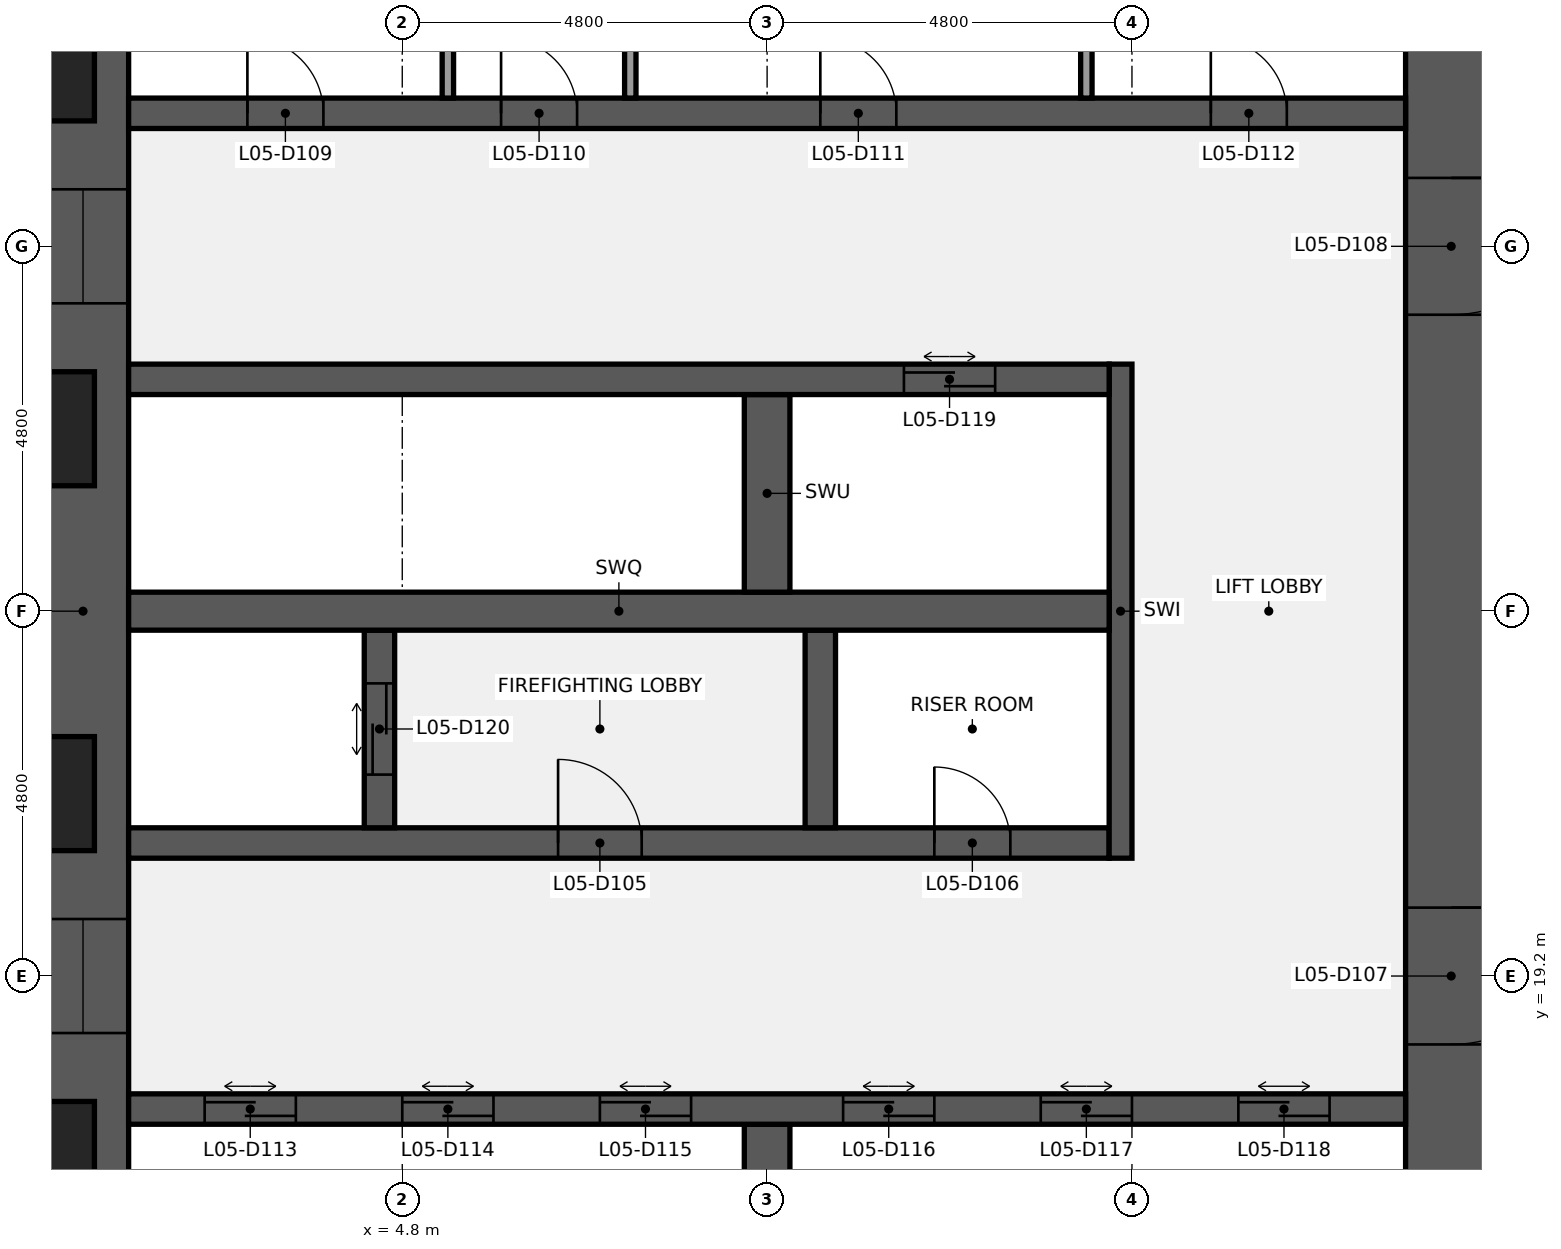
"""IFC4 building model, lengths in metres.
Left out: names, types, materials, properties, quantities, classifications, styles, units other than length and angle.
Written with IfcOpenShell. Run it as: python <this file> out.ifc"""

import sys

from ifc_helpers import new_model, si_unit, direction, frame, frame_2d, origin, place, context, subcontext, project, spatial, rectangle, extrude, element, fill, save


model = new_model("IFC4")
c1 = context("Model", 3, precision=1e-05, world=origin(), true_north=direction((0.0, 1.0)))
c2 = subcontext(c1, "Body", "Model", "MODEL_VIEW")
j1 = project(units=[si_unit("LENGTHUNIT", "METRE"), si_unit("PLANEANGLEUNIT", "RADIAN")], contexts=[c1])
p1 = place(None, origin())
s1 = spatial("IfcSite", under=j1, at=p1, CompositionType="ELEMENT")
p2 = place(p1, origin())
s2 = spatial("IfcBuilding", under=s1, at=p2, CompositionType="ELEMENT")
p3 = place(p2, frame((0.0, 0.0, 30.2)))
s3 = spatial("IfcBuildingStorey", under=s2, at=p3, CompositionType="ELEMENT", Elevation=30.2)
p4 = place(p3, frame((0.6, 9.6, 0.0), z_axis=(0.0, 0.0, 1.0), x_axis=(0.0, 1.0, 0.0)))
e1 = element("IfcWall", 1, at=p4, inside=s3, PredefinedType="SHEAR", context=c2, shape_type="SweptSolid", body=[
    extrude(rectangle(XDim=28.8, YDim=1.2, at=frame_2d((14.4, 0.0))), origin(), (0.0, 0.0, 1.0), 4.24),
])
p5 = place(p4, frame((8.85, 0.0, 0.9)))
e2 = element("IfcOpeningElement", 2, at=p5, cuts=e1, PredefinedType="OPENING", context=c2, shape_type="SweptSolid", body=[
    extrude(rectangle(XDim=1.5, YDim=1.5, at=frame_2d((0.75, 0.75))), frame((0.0, 0.61, 0.0), z_axis=(0.0, -1.0, 0.0), x_axis=(1.0, 0.0, 0.0)), (0.0, 0.0, 1.0), 1.22),
])
p6 = place(p4, frame((18.45, 0.0, 0.9)))
e3 = element("IfcOpeningElement", 3, at=p6, cuts=e1, PredefinedType="OPENING", context=c2, shape_type="SweptSolid", body=[
    extrude(rectangle(XDim=1.5, YDim=1.5, at=frame_2d((0.75, 0.75))), frame((0.0, 0.61, 0.0), z_axis=(0.0, -1.0, 0.0), x_axis=(1.0, 0.0, 0.0)), (0.0, 0.0, 1.0), 1.22),
])
p7 = place(p3, frame((18.6, 38.4, 0.0), z_axis=(0.0, 0.0, 1.0), x_axis=(0.0, -1.0, 0.0)))
e4 = element("IfcWall", 4, at=p7, inside=s3, PredefinedType="SHEAR", context=c2, shape_type="SweptSolid", body=[
    extrude(rectangle(XDim=28.8, YDim=1.2, at=frame_2d((14.4, 0.0))), origin(), (0.0, 0.0, 1.0), 4.24),
])
p8 = place(p7, frame((18.3, 0.0, 0.0)))
e5 = element("IfcOpeningElement", 5, at=p8, cuts=e4, PredefinedType="OPENING", context=c2, shape_type="SweptSolid", body=[
    extrude(rectangle(XDim=1.8, YDim=2.1, at=frame_2d((0.9, 1.05))), frame((0.0, 0.61, 0.0), z_axis=(0.0, -1.0, 0.0), x_axis=(1.0, 0.0, 0.0)), (0.0, 0.0, 1.0), 1.22),
])
p9 = place(p7, frame((8.7, 0.0, 0.0)))
e6 = element("IfcOpeningElement", 6, at=p9, cuts=e4, PredefinedType="OPENING", context=c2, shape_type="SweptSolid", body=[
    extrude(rectangle(XDim=1.8, YDim=2.1, at=frame_2d((0.9, 1.05))), frame((0.0, 0.61, 0.0), z_axis=(0.0, -1.0, 0.0), x_axis=(1.0, 0.0, 0.0)), (0.0, 0.0, 1.0), 1.22),
])
p10 = place(p3, frame((9.6, 14.65, 0.0), z_axis=(0.0, 0.0, 1.0), x_axis=(0.0, 1.0, 0.0)))
e7 = element("IfcWall", 7, at=p10, inside=s3, PredefinedType="SHEAR", context=c2, shape_type="SweptSolid", body=[
    extrude(rectangle(XDim=2.6, YDim=0.6, at=frame_2d((1.3, 0.0))), origin(), (0.0, 0.0, 1.0), 4.24),
])
p11 = place(p3, frame((1.2, 17.45, 0.0), z_axis=(0.0, 0.0, 1.0), x_axis=(1.0, 0.0, 0.0)))
e8 = element("IfcWall", 8, at=p11, inside=s3, PredefinedType="SHEAR", context=c2, shape_type="SweptSolid", body=[
    extrude(rectangle(XDim=16.8, YDim=0.4, at=frame_2d((8.4, 0.0))), origin(), (0.0, 0.0, 1.0), 4.24),
])
p12 = place(p11, frame((1.0, 0.0, 0.0)))
e9 = element("IfcOpeningElement", 9, at=p12, cuts=e8, PredefinedType="OPENING", context=c2, shape_type="SweptSolid", body=[
    extrude(rectangle(XDim=1.2, YDim=2.1, at=frame_2d((0.6, 1.05))), frame((0.0, 0.21, 0.0), z_axis=(0.0, -1.0, 0.0), x_axis=(1.0, 0.0, 0.0)), (0.0, 0.0, 1.0), 0.42),
])
p13 = place(p11, frame((3.6, 0.0, 0.0)))
e10 = element("IfcOpeningElement", 10, at=p13, cuts=e8, PredefinedType="OPENING", context=c2, shape_type="SweptSolid", body=[
    extrude(rectangle(XDim=1.2, YDim=2.1, at=frame_2d((0.6, 1.05))), frame((0.0, 0.21, 0.0), z_axis=(0.0, -1.0, 0.0), x_axis=(1.0, 0.0, 0.0)), (0.0, 0.0, 1.0), 0.42),
])
p14 = place(p11, frame((6.2, 0.0, 0.0)))
e11 = element("IfcOpeningElement", 11, at=p14, cuts=e8, PredefinedType="OPENING", context=c2, shape_type="SweptSolid", body=[
    extrude(rectangle(XDim=1.2, YDim=2.1, at=frame_2d((0.6, 1.05))), frame((0.0, 0.21, 0.0), z_axis=(0.0, -1.0, 0.0), x_axis=(1.0, 0.0, 0.0)), (0.0, 0.0, 1.0), 0.42),
])
p15 = place(p11, frame((9.4, 0.0, 0.0)))
e12 = element("IfcOpeningElement", 12, at=p15, cuts=e8, PredefinedType="OPENING", context=c2, shape_type="SweptSolid", body=[
    extrude(rectangle(XDim=1.2, YDim=2.1, at=frame_2d((0.6, 1.05))), frame((0.0, 0.21, 0.0), z_axis=(0.0, -1.0, 0.0), x_axis=(1.0, 0.0, 0.0)), (0.0, 0.0, 1.0), 0.42),
])
p16 = place(p11, frame((12.0, 0.0, 0.0)))
e13 = element("IfcOpeningElement", 13, at=p16, cuts=e8, PredefinedType="OPENING", context=c2, shape_type="SweptSolid", body=[
    extrude(rectangle(XDim=1.2, YDim=2.1, at=frame_2d((0.6, 1.05))), frame((0.0, 0.21, 0.0), z_axis=(0.0, -1.0, 0.0), x_axis=(1.0, 0.0, 0.0)), (0.0, 0.0, 1.0), 0.42),
])
p17 = place(p11, frame((14.6, 0.0, 0.0)))
e14 = element("IfcOpeningElement", 14, at=p17, cuts=e8, PredefinedType="OPENING", context=c2, shape_type="SweptSolid", body=[
    extrude(rectangle(XDim=1.2, YDim=2.1, at=frame_2d((0.6, 1.05))), frame((0.0, 0.21, 0.0), z_axis=(0.0, -1.0, 0.0), x_axis=(1.0, 0.0, 0.0)), (0.0, 0.0, 1.0), 0.42),
])
p18 = place(p3, frame((1.2, 20.95, 0.0), z_axis=(0.0, 0.0, 1.0), x_axis=(1.0, 0.0, 0.0)))
e15 = element("IfcWall", 15, at=p18, inside=s3, PredefinedType="SHEAR", context=c2, shape_type="SweptSolid", body=[
    extrude(rectangle(XDim=12.9, YDim=0.4, at=frame_2d((6.45, 0.0))), origin(), (0.0, 0.0, 1.0), 4.24),
])
p19 = place(p18, frame((5.65, 0.0, 0.0)))
e16 = element("IfcOpeningElement", 16, at=p19, cuts=e15, PredefinedType="OPENING", context=c2, shape_type="SweptSolid", body=[
    extrude(rectangle(XDim=1.1, YDim=2.1, at=frame_2d((0.55, 1.05))), frame((0.0, 0.21, 0.0), z_axis=(0.0, -1.0, 0.0), x_axis=(1.0, 0.0, 0.0)), (0.0, 0.0, 1.0), 0.42),
])
p20 = place(p18, frame((10.6, 0.0, 0.0)))
e17 = element("IfcOpeningElement", 17, at=p20, cuts=e15, PredefinedType="OPENING", context=c2, shape_type="SweptSolid", body=[
    extrude(rectangle(XDim=1.0, YDim=2.1, at=frame_2d((0.5, 1.05))), frame((0.0, 0.21, 0.0), z_axis=(0.0, -1.0, 0.0), x_axis=(1.0, 0.0, 0.0)), (0.0, 0.0, 1.0), 0.42),
])
p21 = place(p3, frame((14.25, 20.75, 0.0), z_axis=(0.0, 0.0, 1.0), x_axis=(0.0, 1.0, 0.0)))
e18 = element("IfcWall", 18, at=p21, inside=s3, PredefinedType="SHEAR", context=c2, shape_type="SweptSolid", body=[
    extrude(rectangle(XDim=6.5, YDim=0.3, at=frame_2d((3.25, 0.0))), origin(), (0.0, 0.0, 1.0), 4.24),
])
p22 = place(p3, frame((4.5, 21.15, 0.0), z_axis=(0.0, 0.0, 1.0), x_axis=(0.0, 1.0, 0.0)))
e19 = element("IfcWall", 19, at=p22, inside=s3, PredefinedType="SHEAR", context=c2, shape_type="SweptSolid", body=[
    extrude(rectangle(XDim=2.6, YDim=0.4, at=frame_2d((1.3, 0.0))), origin(), (0.0, 0.0, 1.0), 4.24),
])
p23 = place(p22, frame((0.7, 0.0, 0.0)))
e20 = element("IfcOpeningElement", 20, at=p23, cuts=e19, PredefinedType="OPENING", context=c2, shape_type="SweptSolid", body=[
    extrude(rectangle(XDim=1.2, YDim=2.1, at=frame_2d((0.6, 1.05))), frame((0.0, 0.21, 0.0), z_axis=(0.0, -1.0, 0.0), x_axis=(1.0, 0.0, 0.0)), (0.0, 0.0, 1.0), 0.42),
])
p24 = place(p3, frame((10.3, 21.15, 0.0), z_axis=(0.0, 0.0, 1.0), x_axis=(0.0, 1.0, 0.0)))
e21 = element("IfcWall", 21, at=p24, inside=s3, PredefinedType="SHEAR", context=c2, shape_type="SweptSolid", body=[
    extrude(rectangle(XDim=2.6, YDim=0.4, at=frame_2d((1.3, 0.0))), origin(), (0.0, 0.0, 1.0), 4.24),
])
p25 = place(p3, frame((1.2, 24.0, 0.0), z_axis=(0.0, 0.0, 1.0), x_axis=(1.0, 0.0, 0.0)))
e22 = element("IfcWall", 22, at=p25, inside=s3, PredefinedType="SHEAR", context=c2, shape_type="SweptSolid", body=[
    extrude(rectangle(XDim=12.9, YDim=0.5, at=frame_2d((6.45, 0.0))), origin(), (0.0, 0.0, 1.0), 4.24),
])
p26 = place(p3, frame((9.6, 24.25, 0.0), z_axis=(0.0, 0.0, 1.0), x_axis=(0.0, 1.0, 0.0)))
e23 = element("IfcWall", 23, at=p26, inside=s3, PredefinedType="SHEAR", context=c2, shape_type="SweptSolid", body=[
    extrude(rectangle(XDim=2.6, YDim=0.6, at=frame_2d((1.3, 0.0))), origin(), (0.0, 0.0, 1.0), 4.24),
])
p27 = place(p3, frame((1.2, 27.05, 0.0), z_axis=(0.0, 0.0, 1.0), x_axis=(1.0, 0.0, 0.0)))
e24 = element("IfcWall", 24, at=p27, inside=s3, PredefinedType="SHEAR", context=c2, shape_type="SweptSolid", body=[
    extrude(rectangle(XDim=12.9, YDim=0.4, at=frame_2d((6.45, 0.0))), origin(), (0.0, 0.0, 1.0), 4.24),
])
p28 = place(p27, frame((10.2, 0.0, 0.0)))
e25 = element("IfcOpeningElement", 25, at=p28, cuts=e24, PredefinedType="OPENING", context=c2, shape_type="SweptSolid", body=[
    extrude(rectangle(XDim=1.2, YDim=2.1, at=frame_2d((0.6, 1.05))), frame((0.0, 0.21, 0.0), z_axis=(0.0, -1.0, 0.0), x_axis=(1.0, 0.0, 0.0)), (0.0, 0.0, 1.0), 0.42),
])
p29 = place(p3, frame((1.2, 30.55, 0.0), z_axis=(0.0, 0.0, 1.0), x_axis=(1.0, 0.0, 0.0)))
e26 = element("IfcWall", 26, at=p29, inside=s3, PredefinedType="SHEAR", context=c2, shape_type="SweptSolid", body=[
    extrude(rectangle(XDim=16.8, YDim=0.4, at=frame_2d((8.4, 0.0))), origin(), (0.0, 0.0, 1.0), 4.24),
])
p30 = place(p29, frame((1.562, 0.0, 0.0)))
e27 = element("IfcOpeningElement", 27, at=p30, cuts=e26, PredefinedType="OPENING", context=c2, shape_type="SweptSolid", body=[
    extrude(rectangle(XDim=1.0, YDim=2.1, at=frame_2d((0.5, 1.05))), frame((0.0, 0.21, 0.0), z_axis=(0.0, -1.0, 0.0), x_axis=(1.0, 0.0, 0.0)), (0.0, 0.0, 1.0), 0.42),
])
p31 = place(p29, frame((4.9, 0.0, 0.0)))
e28 = element("IfcOpeningElement", 28, at=p31, cuts=e26, PredefinedType="OPENING", context=c2, shape_type="SweptSolid", body=[
    extrude(rectangle(XDim=1.0, YDim=2.1, at=frame_2d((0.5, 1.05))), frame((0.0, 0.21, 0.0), z_axis=(0.0, -1.0, 0.0), x_axis=(1.0, 0.0, 0.0)), (0.0, 0.0, 1.0), 0.42),
])
p32 = place(p29, frame((9.1, 0.0, 0.0)))
e29 = element("IfcOpeningElement", 29, at=p32, cuts=e26, PredefinedType="OPENING", context=c2, shape_type="SweptSolid", body=[
    extrude(rectangle(XDim=1.0, YDim=2.1, at=frame_2d((0.5, 1.05))), frame((0.0, 0.21, 0.0), z_axis=(0.0, -1.0, 0.0), x_axis=(1.0, 0.0, 0.0)), (0.0, 0.0, 1.0), 0.42),
])
p33 = place(p29, frame((14.238, 0.0, 0.0)))
e30 = element("IfcOpeningElement", 30, at=p33, cuts=e26, PredefinedType="OPENING", context=c2, shape_type="SweptSolid", body=[
    extrude(rectangle(XDim=1.0, YDim=2.1, at=frame_2d((0.5, 1.05))), frame((0.0, 0.21, 0.0), z_axis=(0.0, -1.0, 0.0), x_axis=(1.0, 0.0, 0.0)), (0.0, 0.0, 1.0), 0.42),
])
for number, where, z_axis, x_axis in (
    (31, (5.4, 30.75, 0.0), (0.0, 0.0, 1.0), (0.0, 1.0, 0.0)),
    (32, (7.8, 30.75, 0.0), (0.0, 0.0, 1.0), (0.0, 1.0, 0.0)),
    (33, (13.8, 30.75, 0.0), (0.0, 0.0, 1.0), (0.0, 1.0, 0.0)),
):
    element("IfcWall", number, at=place(p3, frame(where, z_axis=z_axis, x_axis=x_axis)), inside=s3, PredefinedType="PARTITIONING", context=c2, shape_type="SweptSolid", body=[
        extrude(rectangle(XDim=2.6, YDim=0.15, at=frame_2d((1.3, 0.0))), origin(), (0.0, 0.0, 1.0), 4.24),
    ])
p34 = place(p19, origin())
e34 = element("IfcDoor", 34, at=p34, inside=s3, OperationType="SINGLE_SWING_LEFT", PredefinedType="DOOR", context=c2, shape_type="SweptSolid", body=[
    extrude(rectangle(XDim=1.1, YDim=2.1, at=frame_2d((0.55, 1.05))), frame((0.0, 0.025, 0.0), z_axis=(0.0, -1.0, 0.0), x_axis=(1.0, 0.0, 0.0)), (0.0, 0.0, 1.0), 0.05),
])
fill(e16, e34)
p35 = place(p20, origin())
e35 = element("IfcDoor", 35, at=p35, inside=s3, OperationType="SINGLE_SWING_LEFT", PredefinedType="DOOR", context=c2, shape_type="SweptSolid", body=[
    extrude(rectangle(XDim=1.0, YDim=2.1, at=frame_2d((0.5, 1.05))), frame((0.0, 0.025, 0.0), z_axis=(0.0, -1.0, 0.0), x_axis=(1.0, 0.0, 0.0)), (0.0, 0.0, 1.0), 0.05),
])
fill(e17, e35)
p36 = place(p8, origin())
e36 = element("IfcDoor", 36, at=p36, inside=s3, OperationType="DOUBLE_DOOR_SINGLE_SWING", PredefinedType="DOOR", context=c2, shape_type="SweptSolid", body=[
    extrude(rectangle(XDim=1.8, YDim=2.1, at=frame_2d((0.9, 1.05))), frame((0.0, 0.025, 0.0), z_axis=(0.0, -1.0, 0.0), x_axis=(1.0, 0.0, 0.0)), (0.0, 0.0, 1.0), 0.05),
])
fill(e5, e36)
p37 = place(p9, origin())
e37 = element("IfcDoor", 37, at=p37, inside=s3, OperationType="DOUBLE_DOOR_SINGLE_SWING", PredefinedType="DOOR", context=c2, shape_type="SweptSolid", body=[
    extrude(rectangle(XDim=1.8, YDim=2.1, at=frame_2d((0.9, 1.05))), frame((0.0, 0.025, 0.0), z_axis=(0.0, -1.0, 0.0), x_axis=(1.0, 0.0, 0.0)), (0.0, 0.0, 1.0), 0.05),
])
fill(e6, e37)
p38 = place(p30, origin())
e38 = element("IfcDoor", 38, at=p38, inside=s3, OperationType="SINGLE_SWING_LEFT", PredefinedType="DOOR", context=c2, shape_type="SweptSolid", body=[
    extrude(rectangle(XDim=1.0, YDim=2.1, at=frame_2d((0.5, 1.05))), frame((0.0, 0.025, 0.0), z_axis=(0.0, -1.0, 0.0), x_axis=(1.0, 0.0, 0.0)), (0.0, 0.0, 1.0), 0.05),
])
fill(e27, e38)
p39 = place(p31, origin())
e39 = element("IfcDoor", 39, at=p39, inside=s3, OperationType="SINGLE_SWING_LEFT", PredefinedType="DOOR", context=c2, shape_type="SweptSolid", body=[
    extrude(rectangle(XDim=1.0, YDim=2.1, at=frame_2d((0.5, 1.05))), frame((0.0, 0.025, 0.0), z_axis=(0.0, -1.0, 0.0), x_axis=(1.0, 0.0, 0.0)), (0.0, 0.0, 1.0), 0.05),
])
fill(e28, e39)
p40 = place(p32, origin())
e40 = element("IfcDoor", 40, at=p40, inside=s3, OperationType="SINGLE_SWING_LEFT", PredefinedType="DOOR", context=c2, shape_type="SweptSolid", body=[
    extrude(rectangle(XDim=1.0, YDim=2.1, at=frame_2d((0.5, 1.05))), frame((0.0, 0.025, 0.0), z_axis=(0.0, -1.0, 0.0), x_axis=(1.0, 0.0, 0.0)), (0.0, 0.0, 1.0), 0.05),
])
fill(e29, e40)
p41 = place(p33, origin())
e41 = element("IfcDoor", 41, at=p41, inside=s3, OperationType="SINGLE_SWING_LEFT", PredefinedType="DOOR", context=c2, shape_type="SweptSolid", body=[
    extrude(rectangle(XDim=1.0, YDim=2.1, at=frame_2d((0.5, 1.05))), frame((0.0, 0.025, 0.0), z_axis=(0.0, -1.0, 0.0), x_axis=(1.0, 0.0, 0.0)), (0.0, 0.0, 1.0), 0.05),
])
fill(e30, e41)
p42 = place(p12, origin())
e42 = element("IfcDoor", 42, at=p42, inside=s3, OperationType="DOUBLE_DOOR_SLIDING", PredefinedType="DOOR", context=c2, shape_type="SweptSolid", body=[
    extrude(rectangle(XDim=1.2, YDim=2.1, at=frame_2d((0.6, 1.05))), frame((0.0, 0.025, 0.0), z_axis=(0.0, -1.0, 0.0), x_axis=(1.0, 0.0, 0.0)), (0.0, 0.0, 1.0), 0.05),
])
fill(e9, e42)
p43 = place(p13, origin())
e43 = element("IfcDoor", 43, at=p43, inside=s3, OperationType="DOUBLE_DOOR_SLIDING", PredefinedType="DOOR", context=c2, shape_type="SweptSolid", body=[
    extrude(rectangle(XDim=1.2, YDim=2.1, at=frame_2d((0.6, 1.05))), frame((0.0, 0.025, 0.0), z_axis=(0.0, -1.0, 0.0), x_axis=(1.0, 0.0, 0.0)), (0.0, 0.0, 1.0), 0.05),
])
fill(e10, e43)
p44 = place(p14, origin())
e44 = element("IfcDoor", 44, at=p44, inside=s3, OperationType="DOUBLE_DOOR_SLIDING", PredefinedType="DOOR", context=c2, shape_type="SweptSolid", body=[
    extrude(rectangle(XDim=1.2, YDim=2.1, at=frame_2d((0.6, 1.05))), frame((0.0, 0.025, 0.0), z_axis=(0.0, -1.0, 0.0), x_axis=(1.0, 0.0, 0.0)), (0.0, 0.0, 1.0), 0.05),
])
fill(e11, e44)
p45 = place(p15, origin())
e45 = element("IfcDoor", 45, at=p45, inside=s3, OperationType="DOUBLE_DOOR_SLIDING", PredefinedType="DOOR", context=c2, shape_type="SweptSolid", body=[
    extrude(rectangle(XDim=1.2, YDim=2.1, at=frame_2d((0.6, 1.05))), frame((0.0, 0.025, 0.0), z_axis=(0.0, -1.0, 0.0), x_axis=(1.0, 0.0, 0.0)), (0.0, 0.0, 1.0), 0.05),
])
fill(e12, e45)
p46 = place(p16, origin())
e46 = element("IfcDoor", 46, at=p46, inside=s3, OperationType="DOUBLE_DOOR_SLIDING", PredefinedType="DOOR", context=c2, shape_type="SweptSolid", body=[
    extrude(rectangle(XDim=1.2, YDim=2.1, at=frame_2d((0.6, 1.05))), frame((0.0, 0.025, 0.0), z_axis=(0.0, -1.0, 0.0), x_axis=(1.0, 0.0, 0.0)), (0.0, 0.0, 1.0), 0.05),
])
fill(e13, e46)
p47 = place(p17, origin())
e47 = element("IfcDoor", 47, at=p47, inside=s3, OperationType="DOUBLE_DOOR_SLIDING", PredefinedType="DOOR", context=c2, shape_type="SweptSolid", body=[
    extrude(rectangle(XDim=1.2, YDim=2.1, at=frame_2d((0.6, 1.05))), frame((0.0, 0.025, 0.0), z_axis=(0.0, -1.0, 0.0), x_axis=(1.0, 0.0, 0.0)), (0.0, 0.0, 1.0), 0.05),
])
fill(e14, e47)
p48 = place(p28, origin())
e48 = element("IfcDoor", 48, at=p48, inside=s3, OperationType="DOUBLE_DOOR_SLIDING", PredefinedType="DOOR", context=c2, shape_type="SweptSolid", body=[
    extrude(rectangle(XDim=1.2, YDim=2.1, at=frame_2d((0.6, 1.05))), frame((0.0, 0.025, 0.0), z_axis=(0.0, -1.0, 0.0), x_axis=(1.0, 0.0, 0.0)), (0.0, 0.0, 1.0), 0.05),
])
fill(e25, e48)
p49 = place(p23, origin())
e49 = element("IfcDoor", 49, at=p49, inside=s3, OperationType="DOUBLE_DOOR_SLIDING", PredefinedType="DOOR", context=c2, shape_type="SweptSolid", body=[
    extrude(rectangle(XDim=1.2, YDim=2.1, at=frame_2d((0.6, 1.05))), frame((0.0, 0.025, 0.0), z_axis=(0.0, -1.0, 0.0), x_axis=(1.0, 0.0, 0.0)), (0.0, 0.0, 1.0), 0.05),
])
fill(e20, e49)
p50 = place(p5, origin())
e50 = element("IfcWindow", 50, at=p50, inside=s3, PartitioningType="SINGLE_PANEL", PredefinedType="WINDOW", context=c2, shape_type="SweptSolid", body=[
    extrude(rectangle(XDim=1.5, YDim=1.5, at=frame_2d((0.75, 0.75))), frame((0.0, 0.03, 0.0), z_axis=(0.0, -1.0, 0.0), x_axis=(1.0, 0.0, 0.0)), (0.0, 0.0, 1.0), 0.06),
])
fill(e2, e50)
p51 = place(p6, origin())
e51 = element("IfcWindow", 51, at=p51, inside=s3, PartitioningType="SINGLE_PANEL", PredefinedType="WINDOW", context=c2, shape_type="SweptSolid", body=[
    extrude(rectangle(XDim=1.5, YDim=1.5, at=frame_2d((0.75, 0.75))), frame((0.0, 0.03, 0.0), z_axis=(0.0, -1.0, 0.0), x_axis=(1.0, 0.0, 0.0)), (0.0, 0.0, 1.0), 0.06),
])
fill(e3, e51)
save(model, sys.argv[1])
